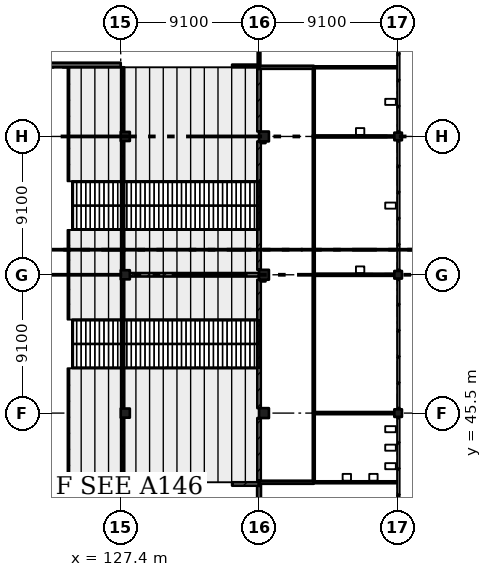
"""IFC4 building model, lengths in metres.
Left out: names, types, materials, properties, quantities, classifications, styles, units other than length and angle.
Written with IfcOpenShell. Run it as: python <this file> out.ifc"""

import sys

from ifc_helpers import new_model, si_unit, direction, frame, frame_2d, origin, origin_2d, place, context, subcontext, project, spatial, rectangle, extrude, element, fill, save


model = new_model("IFC4")
c1 = context("Model", 3, precision=1e-05, world=origin(), true_north=direction((0.0, 1.0)))
c2 = subcontext(c1, "Body", "Model", "MODEL_VIEW")
j1 = project(units=[si_unit("LENGTHUNIT", "METRE"), si_unit("PLANEANGLEUNIT", "RADIAN")], contexts=[c1])
p1 = place(None, origin())
s1 = spatial("IfcSite", under=j1, at=p1, CompositionType="ELEMENT")
p2 = place(p1, origin())
s2 = spatial("IfcBuilding", under=s1, at=p2, CompositionType="ELEMENT")
p3 = place(p2, frame((0.0, 0.0, 15.47)))
s3 = spatial("IfcBuildingStorey", under=s2, at=p3, CompositionType="ELEMENT", Elevation=15.47)
for number, where, z_axis, x_axis in (
    (1, (127.7, 45.5, 0.0), (0.0, 0.0, 1.0), (1.0, 0.0, 0.0)),
    (2, (127.7, 54.6, 0.0), (0.0, 0.0, 1.0), (1.0, 0.0, 0.0)),
    (3, (127.7, 63.7, 0.0), (0.0, 0.0, 1.0), (1.0, 0.0, 0.0)),
):
    element("IfcColumn", number, at=place(p3, frame(where, z_axis=z_axis, x_axis=x_axis)), inside=s3, PredefinedType="COLUMN", context=c2, shape_type="SweptSolid", body=[
        extrude(rectangle(XDim=0.6, YDim=0.6, at=origin_2d()), origin(), (0.0, 0.0, 1.0), 2.71),
    ])
for number, where, z_axis, x_axis in (
    (4, (136.825, 45.5, 0.0), (0.0, 0.0, 1.0), (1.0, 0.0, 0.0)),
    (5, (136.825, 54.6, 0.0), (0.0, 0.0, 1.0), (1.0, 0.0, 0.0)),
    (6, (136.825, 63.7, 0.0), (0.0, 0.0, 1.0), (1.0, 0.0, 0.0)),
):
    element("IfcColumn", number, at=place(p3, frame(where, z_axis=z_axis, x_axis=x_axis)), inside=s3, PredefinedType="COLUMN", context=c2, shape_type="SweptSolid", body=[
        extrude(rectangle(XDim=0.65, YDim=0.65, at=origin_2d()), origin(), (0.0, 0.0, 1.0), 4.55),
    ])
for number, where, z_axis, x_axis in (
    (7, (145.65, 45.5, 0.0), (0.0, 0.0, 1.0), (1.0, 0.0, 0.0)),
    (8, (145.65, 54.6, 0.0), (0.0, 0.0, 1.0), (1.0, 0.0, 0.0)),
    (9, (145.65, 63.7, 0.0), (0.0, 0.0, 1.0), (1.0, 0.0, 0.0)),
):
    element("IfcColumn", number, at=place(p3, frame(where, z_axis=z_axis, x_axis=x_axis)), inside=s3, PredefinedType="COLUMN", context=c2, shape_type="SweptSolid", body=[
        extrude(rectangle(XDim=0.5, YDim=0.5, at=origin_2d()), origin(), (0.0, 0.0, 1.0), 4.55),
    ])
for number, where, z_axis, x_axis in (
    (10, (104.65, 40.8, 0.0), (0.0, 0.0, 1.0), (1.0, 0.0, 0.0)),
    (11, (104.65, 68.4, 0.0), (0.0, 0.0, 1.0), (1.0, 0.0, 0.0)),
):
    element("IfcWall", number, at=place(p3, frame(where, z_axis=z_axis, x_axis=x_axis)), inside=s3, PredefinedType="SHEAR", context=c2, shape_type="SweptSolid", body=[
        extrude(rectangle(XDim=22.75, YDim=0.3, at=frame_2d((11.375, 0.0))), origin(), (0.0, 0.0, 1.0), 4.55),
    ])
p4 = place(p3, frame((127.4, 36.8, 0.0), z_axis=(0.0, 0.0, 1.0), x_axis=(0.0, 1.0, 0.0)))
e12 = element("IfcWall", 12, at=p4, inside=s3, PredefinedType="SOLIDWALL", context=c2, shape_type="SweptSolid", body=[
    extrude(rectangle(XDim=3.85, YDim=0.14, at=frame_2d((1.925, 0.0))), origin(), (0.0, 0.0, 1.0), 4.3),
])
p5 = place(p3, frame((128.0, 54.6, 0.0), z_axis=(0.0, 0.0, 1.0), x_axis=(1.0, 0.0, 0.0)))
e13 = element("IfcWall", 13, at=p5, inside=s3, PredefinedType="PARTITIONING", context=c2, shape_type="SweptSolid", body=[
    extrude(rectangle(XDim=6.67, YDim=0.225, at=frame_2d((3.335, 0.0))), origin(), (0.0, 0.0, 1.0), 3.22),
])
p6 = place(p3, frame((134.73, 40.836, 0.0), z_axis=(0.0, 0.0, 1.0), x_axis=(1.0, 0.0, 0.0)))
e14 = element("IfcWall", 14, at=p6, inside=s3, PredefinedType="PARTITIONING", context=c2, shape_type="SweptSolid", body=[
    extrude(rectangle(XDim=1.77, YDim=0.225, at=frame_2d((0.885, 0.0))), origin(), (0.0, 0.0, 1.0), 4.3),
])
p7 = place(p3, frame((134.73, 54.6, 0.0), z_axis=(0.0, 0.0, 1.0), x_axis=(1.0, 0.0, 0.0)))
e15 = element("IfcWall", 15, at=p7, inside=s3, PredefinedType="PARTITIONING", context=c2, shape_type="SweptSolid", body=[
    extrude(rectangle(XDim=1.77, YDim=0.225, at=frame_2d((0.885, 0.0))), origin(), (0.0, 0.0, 1.0), 3.22),
])
p8 = place(p3, frame((136.5, 40.837, 0.0), z_axis=(0.0, 0.0, 1.0), x_axis=(0.0, -1.0, 0.0)))
e16 = element("IfcWall", 16, at=p8, inside=s3, PredefinedType="SOLIDWALL", context=c2, shape_type="SweptSolid", body=[
    extrude(rectangle(XDim=4.087, YDim=0.25, at=frame_2d((2.044, 0.0))), origin(), (0.0, 0.0, 1.0), 3.55),
])
p9 = place(p3, frame((136.5, 40.95, 0.0), z_axis=(0.0, 0.0, 1.0), x_axis=(1.0, 0.0, 0.0)))
e17 = element("IfcWall", 17, at=p9, inside=s3, PredefinedType="PARTITIONING", context=c2, shape_type="SweptSolid", body=[
    extrude(rectangle(XDim=3.6, YDim=0.2, at=frame_2d((1.8, 0.0))), origin(), (0.0, 0.0, 1.0), 4.3),
])
p10 = place(p9, frame((0.55, 0.0, 0.0)))
e18 = element("IfcOpeningElement", 18, at=p10, cuts=e17, PredefinedType="OPENING", context=c2, shape_type="SweptSolid", body=[
    extrude(rectangle(XDim=2.4, YDim=2.4, at=frame_2d((1.2, 1.2))), frame((0.0, 0.11, 0.0), z_axis=(0.0, -1.0, 0.0), x_axis=(1.0, 0.0, 0.0)), (0.0, 0.0, 1.0), 0.22),
])
p11 = place(p3, frame((136.5, 41.062, 0.0), z_axis=(0.0, 0.0, 1.0), x_axis=(0.0, 1.0, 0.0)))
e19 = element("IfcWall", 19, at=p11, inside=s3, PredefinedType="PARTITIONING", context=c2, shape_type="SweptSolid", body=[
    extrude(rectangle(XDim=4.113, YDim=0.225, at=frame_2d((2.056, 0.0))), origin(), (0.0, 0.0, 1.0), 3.55),
])
p12 = place(p3, frame((136.5, 45.825, 0.0), z_axis=(0.0, 0.0, 1.0), x_axis=(0.0, 1.0, 0.0)))
e20 = element("IfcWall", 20, at=p12, inside=s3, PredefinedType="PARTITIONING", context=c2, shape_type="SweptSolid", body=[
    extrude(rectangle(XDim=8.45, YDim=0.225, at=frame_2d((4.225, 0.0))), origin(), (0.0, 0.0, 1.0), 3.55),
])
p13 = place(p12, frame((3.75, 0.0, 0.0)))
e21 = element("IfcOpeningElement", 21, at=p13, cuts=e20, PredefinedType="OPENING", context=c2, shape_type="SweptSolid", body=[
    extrude(rectangle(XDim=1.0, YDim=2.4, at=frame_2d((0.5, 1.2))), frame((0.0, 0.123, 0.0), z_axis=(0.0, -1.0, 0.0), x_axis=(1.0, 0.0, 0.0)), (0.0, 0.0, 1.0), 0.245),
])
p14 = place(p3, frame((136.5, 54.925, 0.0), z_axis=(0.0, 0.0, 1.0), x_axis=(0.0, 1.0, 0.0)))
e22 = element("IfcWall", 22, at=p14, inside=s3, PredefinedType="PARTITIONING", context=c2, shape_type="SweptSolid", body=[
    extrude(rectangle(XDim=8.45, YDim=0.225, at=frame_2d((4.225, 0.0))), origin(), (0.0, 0.0, 1.0), 3.55),
])
p15 = place(p14, frame((3.75, 0.0, 0.0)))
e23 = element("IfcOpeningElement", 23, at=p15, cuts=e22, PredefinedType="OPENING", context=c2, shape_type="SweptSolid", body=[
    extrude(rectangle(XDim=1.0, YDim=2.4, at=frame_2d((0.5, 1.2))), frame((0.0, 0.123, 0.0), z_axis=(0.0, -1.0, 0.0), x_axis=(1.0, 0.0, 0.0)), (0.0, 0.0, 1.0), 0.245),
])
p16 = place(p3, frame((136.5, 64.025, 0.0), z_axis=(0.0, 0.0, 1.0), x_axis=(0.0, 1.0, 0.0)))
e24 = element("IfcWall", 24, at=p16, inside=s3, PredefinedType="PARTITIONING", context=c2, shape_type="SweptSolid", body=[
    extrude(rectangle(XDim=4.125, YDim=0.225, at=frame_2d((2.062, 0.0))), origin(), (0.0, 0.0, 1.0), 3.55),
])
p17 = place(p3, frame((136.5, 68.338, 0.0), z_axis=(0.0, 0.0, 1.0), x_axis=(-1.0, 0.0, 0.0)))
e25 = element("IfcWall", 25, at=p17, inside=s3, PredefinedType="PARTITIONING", context=c2, shape_type="SweptSolid", body=[
    extrude(rectangle(XDim=1.77, YDim=0.175, at=frame_2d((0.885, 0.0))), origin(), (0.0, 0.0, 1.0), 4.3),
])
p18 = place(p3, frame((136.5, 72.45, 0.0), z_axis=(0.0, 0.0, 1.0), x_axis=(0.0, -1.0, 0.0)))
e26 = element("IfcWall", 26, at=p18, inside=s3, PredefinedType="PARTITIONING", context=c2, shape_type="SweptSolid", body=[
    extrude(rectangle(XDim=4.1, YDim=0.175, at=frame_2d((2.05, 0.0))), origin(), (0.0, 0.0, 1.0), 3.55),
])
for number, where, z_axis, x_axis in (
    (27, (136.6, 54.275, 0.0), (0.0, 0.0, 1.0), (1.0, 0.0, 0.0)),
    (28, (136.6, 63.375, 0.0), (0.0, 0.0, 1.0), (1.0, 0.0, 0.0)),
):
    element("IfcWall", number, at=place(p3, frame(where, z_axis=z_axis, x_axis=x_axis)), inside=s3, PredefinedType="PARTITIONING", context=c2, shape_type="SweptSolid", body=[
        extrude(rectangle(XDim=0.325, YDim=0.225, at=frame_2d((0.163, 0.0))), origin(), (0.0, 0.0, 1.0), 4.3),
    ])
p19 = place(p3, frame((140.1, 40.95, 0.0), z_axis=(0.0, 0.0, 1.0), x_axis=(1.0, 0.0, 0.0)))
e29 = element("IfcWall", 29, at=p19, inside=s3, PredefinedType="PARTITIONING", context=c2, shape_type="SweptSolid", body=[
    extrude(rectangle(XDim=5.47, YDim=0.125, at=frame_2d((2.735, 0.0))), origin(), (0.0, 0.0, 1.0), 4.3),
])
p20 = place(p3, frame((140.1, 45.5, 0.0), z_axis=(0.0, 0.0, 1.0), x_axis=(0.0, -1.0, 0.0)))
e30 = element("IfcWall", 30, at=p20, inside=s3, PredefinedType="PARTITIONING", context=c2, shape_type="SweptSolid", body=[
    extrude(rectangle(XDim=4.45, YDim=0.125, at=frame_2d((2.225, 0.0))), origin(), (0.0, 0.0, 1.0), 4.3),
])
p21 = place(p20, frame((1.75, 0.0, 0.0)))
e31 = element("IfcOpeningElement", 31, at=p21, cuts=e30, PredefinedType="OPENING", context=c2, shape_type="SweptSolid", body=[
    extrude(rectangle(XDim=0.9, YDim=2.1, at=frame_2d((0.45, 1.05))), frame((0.0, 0.073, 0.0), z_axis=(0.0, -1.0, 0.0), x_axis=(1.0, 0.0, 0.0)), (0.0, 0.0, 1.0), 0.145),
])
p22 = place(p3, frame((140.1, 54.6, 0.0), z_axis=(0.0, 0.0, 1.0), x_axis=(0.0, -1.0, 0.0)))
e32 = element("IfcWall", 32, at=p22, inside=s3, PredefinedType="SOLIDWALL", context=c2, shape_type="SweptSolid", body=[
    extrude(rectangle(XDim=9.1, YDim=0.14, at=frame_2d((4.55, 0.0))), origin(), (0.0, 0.0, 1.0), 4.3),
])
p23 = place(p22, frame((3.75, 0.0, 0.0)))
e33 = element("IfcOpeningElement", 33, at=p23, cuts=e32, PredefinedType="OPENING", context=c2, shape_type="SweptSolid", body=[
    extrude(rectangle(XDim=1.5, YDim=2.1, at=frame_2d((0.75, 1.05))), frame((0.0, 0.08, 0.0), z_axis=(0.0, -1.0, 0.0), x_axis=(1.0, 0.0, 0.0)), (0.0, 0.0, 1.0), 0.16),
])
p24 = place(p3, frame((140.1, 54.6, 0.0), z_axis=(0.0, 0.0, 1.0), x_axis=(0.0, 1.0, 0.0)))
e34 = element("IfcWall", 34, at=p24, inside=s3, PredefinedType="PARTITIONING", context=c2, shape_type="SweptSolid", body=[
    extrude(rectangle(XDim=13.55, YDim=0.125, at=frame_2d((6.775, 0.0))), origin(), (0.0, 0.0, 1.0), 4.3),
])
p25 = place(p24, frame((4.05, 0.0, 0.0)))
e35 = element("IfcOpeningElement", 35, at=p25, cuts=e34, PredefinedType="OPENING", context=c2, shape_type="SweptSolid", body=[
    extrude(rectangle(XDim=1.0, YDim=2.1, at=frame_2d((0.5, 1.05))), frame((0.0, 0.073, 0.0), z_axis=(0.0, -1.0, 0.0), x_axis=(1.0, 0.0, 0.0)), (0.0, 0.0, 1.0), 0.145),
])
p26 = place(p24, frame((10.8, 0.0, 0.0)))
e36 = element("IfcOpeningElement", 36, at=p26, cuts=e34, PredefinedType="OPENING", context=c2, shape_type="SweptSolid", body=[
    extrude(rectangle(XDim=1.0, YDim=2.1, at=frame_2d((0.5, 1.05))), frame((0.0, 0.073, 0.0), z_axis=(0.0, -1.0, 0.0), x_axis=(1.0, 0.0, 0.0)), (0.0, 0.0, 1.0), 0.145),
])
p27 = place(p3, frame((140.1, 68.25, 0.0), z_axis=(0.0, 0.0, 1.0), x_axis=(-1.0, 0.0, 0.0)))
e37 = element("IfcWall", 37, at=p27, inside=s3, PredefinedType="PARTITIONING", context=c2, shape_type="SweptSolid", body=[
    extrude(rectangle(XDim=3.6, YDim=0.2, at=frame_2d((1.8, 0.0))), origin(), (0.0, 0.0, 1.0), 4.3),
])
p28 = place(p27, frame((0.55, 0.0, 0.0)))
e38 = element("IfcOpeningElement", 38, at=p28, cuts=e37, PredefinedType="OPENING", context=c2, shape_type="SweptSolid", body=[
    extrude(rectangle(XDim=2.4, YDim=2.4, at=frame_2d((1.2, 1.2))), frame((0.0, 0.11, 0.0), z_axis=(0.0, -1.0, 0.0), x_axis=(1.0, 0.0, 0.0)), (0.0, 0.0, 1.0), 0.22),
])
p29 = place(p3, frame((140.163, 63.7, 0.0), z_axis=(0.0, 0.0, 1.0), x_axis=(1.0, 0.0, 0.0)))
e39 = element("IfcWall", 39, at=p29, inside=s3, PredefinedType="PARTITIONING", context=c2, shape_type="SweptSolid", body=[
    extrude(rectangle(XDim=5.237, YDim=0.125, at=frame_2d((2.619, 0.0))), origin(), (0.0, 0.0, 1.0), 3.6),
])
for number, where, z_axis, x_axis in (
    (40, (140.17, 45.5, 0.0), (0.0, 0.0, 1.0), (1.0, 0.0, 0.0)),
    (41, (140.17, 54.6, 0.0), (0.0, 0.0, 1.0), (1.0, 0.0, 0.0)),
):
    element("IfcWall", number, at=place(p3, frame(where, z_axis=z_axis, x_axis=x_axis)), inside=s3, PredefinedType="SOLIDWALL", context=c2, shape_type="SweptSolid", body=[
        extrude(rectangle(XDim=5.23, YDim=0.14, at=frame_2d((2.615, 0.0))), origin(), (0.0, 0.0, 1.0), 3.6),
    ])
p30 = place(p3, frame((145.57, 68.25, 0.0), z_axis=(0.0, 0.0, 1.0), x_axis=(-1.0, 0.0, 0.0)))
e42 = element("IfcWall", 42, at=p30, inside=s3, PredefinedType="PARTITIONING", context=c2, shape_type="SweptSolid", body=[
    extrude(rectangle(XDim=5.47, YDim=0.125, at=frame_2d((2.735, 0.0))), origin(), (0.0, 0.0, 1.0), 4.3),
])
p31 = place(p3, frame((127.53, 40.95, 0.0), z_axis=(0.0, 0.0, 1.0), x_axis=(0.0, 1.0, 0.0)))
e43 = element("IfcWall", 43, at=p31, inside=s3, PredefinedType="PARTITIONING", context=c2, shape_type="SweptSolid", body=[
    extrude(rectangle(XDim=4.25, YDim=0.2, at=frame_2d((2.125, 0.0))), origin(), (0.0, 0.0, 1.0), 2.91),
])
p32 = place(p31, frame((1.125, 0.0, 1.1)))
e44 = element("IfcOpeningElement", 44, at=p32, cuts=e43, PredefinedType="OPENING", context=c2, shape_type="SweptSolid", body=[
    extrude(rectangle(XDim=2.0, YDim=1.3, at=frame_2d((1.0, 0.65))), frame((0.0, 0.11, 0.0), z_axis=(0.0, -1.0, 0.0), x_axis=(1.0, 0.0, 0.0)), (0.0, 0.0, 1.0), 0.22),
])
p33 = place(p3, frame((127.53, 45.8, 0.0), z_axis=(0.0, 0.0, 1.0), x_axis=(0.0, 1.0, 0.0)))
e45 = element("IfcWall", 45, at=p33, inside=s3, PredefinedType="PARTITIONING", context=c2, shape_type="SweptSolid", body=[
    extrude(rectangle(XDim=8.5, YDim=0.2, at=frame_2d((4.25, 0.0))), origin(), (0.0, 0.0, 1.0), 2.71),
])
p34 = place(p33, frame((1.25, 0.0, 1.1)))
e46 = element("IfcOpeningElement", 46, at=p34, cuts=e45, PredefinedType="OPENING", context=c2, shape_type="SweptSolid", body=[
    extrude(rectangle(XDim=6.0, YDim=1.3, at=frame_2d((3.0, 0.65))), frame((0.0, 0.11, 0.0), z_axis=(0.0, -1.0, 0.0), x_axis=(1.0, 0.0, 0.0)), (0.0, 0.0, 1.0), 0.22),
])
p35 = place(p3, frame((127.53, 54.9, 0.0), z_axis=(0.0, 0.0, 1.0), x_axis=(0.0, 1.0, 0.0)))
e47 = element("IfcWall", 47, at=p35, inside=s3, PredefinedType="PARTITIONING", context=c2, shape_type="SweptSolid", body=[
    extrude(rectangle(XDim=8.5, YDim=0.2, at=frame_2d((4.25, 0.0))), origin(), (0.0, 0.0, 1.0), 2.71),
])
p36 = place(p35, frame((1.25, 0.0, 1.1)))
e48 = element("IfcOpeningElement", 48, at=p36, cuts=e47, PredefinedType="OPENING", context=c2, shape_type="SweptSolid", body=[
    extrude(rectangle(XDim=6.0, YDim=1.3, at=frame_2d((3.0, 0.65))), frame((0.0, 0.11, 0.0), z_axis=(0.0, -1.0, 0.0), x_axis=(1.0, 0.0, 0.0)), (0.0, 0.0, 1.0), 0.22),
])
p37 = place(p3, frame((127.53, 64.0, 0.0), z_axis=(0.0, 0.0, 1.0), x_axis=(0.0, 1.0, 0.0)))
e49 = element("IfcWall", 49, at=p37, inside=s3, PredefinedType="PARTITIONING", context=c2, shape_type="SweptSolid", body=[
    extrude(rectangle(XDim=4.25, YDim=0.2, at=frame_2d((2.125, 0.0))), origin(), (0.0, 0.0, 1.0), 2.91),
])
p38 = place(p37, frame((1.125, 0.0, 1.1)))
e50 = element("IfcOpeningElement", 50, at=p38, cuts=e49, PredefinedType="OPENING", context=c2, shape_type="SweptSolid", body=[
    extrude(rectangle(XDim=2.0, YDim=1.3, at=frame_2d((1.0, 0.65))), frame((0.0, 0.11, 0.0), z_axis=(0.0, -1.0, 0.0), x_axis=(1.0, 0.0, 0.0)), (0.0, 0.0, 1.0), 0.22),
])
p39 = place(p32, origin())
e51 = element("IfcWindow", 51, at=p39, inside=s3, PartitioningType="SINGLE_PANEL", PredefinedType="WINDOW", context=c2, shape_type="SweptSolid", body=[
    extrude(rectangle(XDim=2.0, YDim=1.3, at=frame_2d((1.0, 0.65))), frame((0.0, 0.03, 0.0), z_axis=(0.0, -1.0, 0.0), x_axis=(1.0, 0.0, 0.0)), (0.0, 0.0, 1.0), 0.06),
])
fill(e44, e51)
p40 = place(p34, origin())
e52 = element("IfcWindow", 52, at=p40, inside=s3, PartitioningType="SINGLE_PANEL", PredefinedType="WINDOW", context=c2, shape_type="SweptSolid", body=[
    extrude(rectangle(XDim=6.0, YDim=1.3, at=frame_2d((3.0, 0.65))), frame((0.0, 0.03, 0.0), z_axis=(0.0, -1.0, 0.0), x_axis=(1.0, 0.0, 0.0)), (0.0, 0.0, 1.0), 0.06),
])
fill(e46, e52)
p41 = place(p36, origin())
e53 = element("IfcWindow", 53, at=p41, inside=s3, PartitioningType="SINGLE_PANEL", PredefinedType="WINDOW", context=c2, shape_type="SweptSolid", body=[
    extrude(rectangle(XDim=6.0, YDim=1.3, at=frame_2d((3.0, 0.65))), frame((0.0, 0.03, 0.0), z_axis=(0.0, -1.0, 0.0), x_axis=(1.0, 0.0, 0.0)), (0.0, 0.0, 1.0), 0.06),
])
fill(e48, e53)
p42 = place(p38, origin())
e54 = element("IfcWindow", 54, at=p42, inside=s3, PartitioningType="SINGLE_PANEL", PredefinedType="WINDOW", context=c2, shape_type="SweptSolid", body=[
    extrude(rectangle(XDim=2.0, YDim=1.3, at=frame_2d((1.0, 0.65))), frame((0.0, 0.03, 0.0), z_axis=(0.0, -1.0, 0.0), x_axis=(1.0, 0.0, 0.0)), (0.0, 0.0, 1.0), 0.06),
])
fill(e50, e54)
p43 = place(p21, origin())
e55 = element("IfcDoor", 55, at=p43, inside=s3, OperationType="SINGLE_SWING_RIGHT", PredefinedType="DOOR", context=c2, shape_type="SweptSolid", body=[
    extrude(rectangle(XDim=0.9, YDim=2.1, at=frame_2d((0.45, 1.05))), frame((0.0, 0.025, 0.0), z_axis=(0.0, -1.0, 0.0), x_axis=(1.0, 0.0, 0.0)), (0.0, 0.0, 1.0), 0.05),
])
fill(e31, e55)
p44 = place(p23, origin())
e56 = element("IfcDoor", 56, at=p44, inside=s3, OperationType="DOUBLE_DOOR_SINGLE_SWING", PredefinedType="DOOR", context=c2, shape_type="SweptSolid", body=[
    extrude(rectangle(XDim=1.5, YDim=2.1, at=frame_2d((0.75, 1.05))), frame((0.0, 0.025, 0.0), z_axis=(0.0, -1.0, 0.0), x_axis=(1.0, 0.0, 0.0)), (0.0, 0.0, 1.0), 0.05),
])
fill(e33, e56)
p45 = place(p25, origin())
e57 = element("IfcDoor", 57, at=p45, inside=s3, OperationType="SINGLE_SWING_RIGHT", PredefinedType="DOOR", context=c2, shape_type="SweptSolid", body=[
    extrude(rectangle(XDim=1.0, YDim=2.1, at=frame_2d((0.5, 1.05))), frame((0.0, 0.025, 0.0), z_axis=(0.0, -1.0, 0.0), x_axis=(1.0, 0.0, 0.0)), (0.0, 0.0, 1.0), 0.05),
])
fill(e35, e57)
p46 = place(p26, origin())
e58 = element("IfcDoor", 58, at=p46, inside=s3, OperationType="SINGLE_SWING_LEFT", PredefinedType="DOOR", context=c2, shape_type="SweptSolid", body=[
    extrude(rectangle(XDim=1.0, YDim=2.1, at=frame_2d((0.5, 1.05))), frame((0.0, 0.025, 0.0), z_axis=(0.0, -1.0, 0.0), x_axis=(1.0, 0.0, 0.0)), (0.0, 0.0, 1.0), 0.05),
])
fill(e36, e58)
p47 = place(p13, origin())
e59 = element("IfcDoor", 59, at=p47, inside=s3, OperationType="SINGLE_SWING_LEFT", PredefinedType="DOOR", context=c2, shape_type="SweptSolid", body=[
    extrude(rectangle(XDim=1.0, YDim=2.4, at=frame_2d((0.5, 1.2))), frame((0.0, 0.025, 0.0), z_axis=(0.0, -1.0, 0.0), x_axis=(1.0, 0.0, 0.0)), (0.0, 0.0, 1.0), 0.05),
])
fill(e21, e59)
p48 = place(p15, origin())
e60 = element("IfcDoor", 60, at=p48, inside=s3, OperationType="SINGLE_SWING_LEFT", PredefinedType="DOOR", context=c2, shape_type="SweptSolid", body=[
    extrude(rectangle(XDim=1.0, YDim=2.4, at=frame_2d((0.5, 1.2))), frame((0.0, 0.025, 0.0), z_axis=(0.0, -1.0, 0.0), x_axis=(1.0, 0.0, 0.0)), (0.0, 0.0, 1.0), 0.05),
])
fill(e23, e60)
p49 = place(p10, origin())
e61 = element("IfcDoor", 61, at=p49, inside=s3, OperationType="DOUBLE_DOOR_SINGLE_SWING", PredefinedType="DOOR", context=c2, shape_type="SweptSolid", body=[
    extrude(rectangle(XDim=2.4, YDim=2.4, at=frame_2d((1.2, 1.2))), frame((0.0, 0.025, 0.0), z_axis=(0.0, -1.0, 0.0), x_axis=(1.0, 0.0, 0.0)), (0.0, 0.0, 1.0), 0.05),
])
fill(e18, e61)
p50 = place(p28, origin())
e62 = element("IfcDoor", 62, at=p50, inside=s3, OperationType="DOUBLE_DOOR_SINGLE_SWING", PredefinedType="DOOR", context=c2, shape_type="SweptSolid", body=[
    extrude(rectangle(XDim=2.4, YDim=2.4, at=frame_2d((1.2, 1.2))), frame((0.0, 0.025, 0.0), z_axis=(0.0, -1.0, 0.0), x_axis=(1.0, 0.0, 0.0)), (0.0, 0.0, 1.0), 0.05),
])
fill(e38, e62)
save(model, sys.argv[1])
